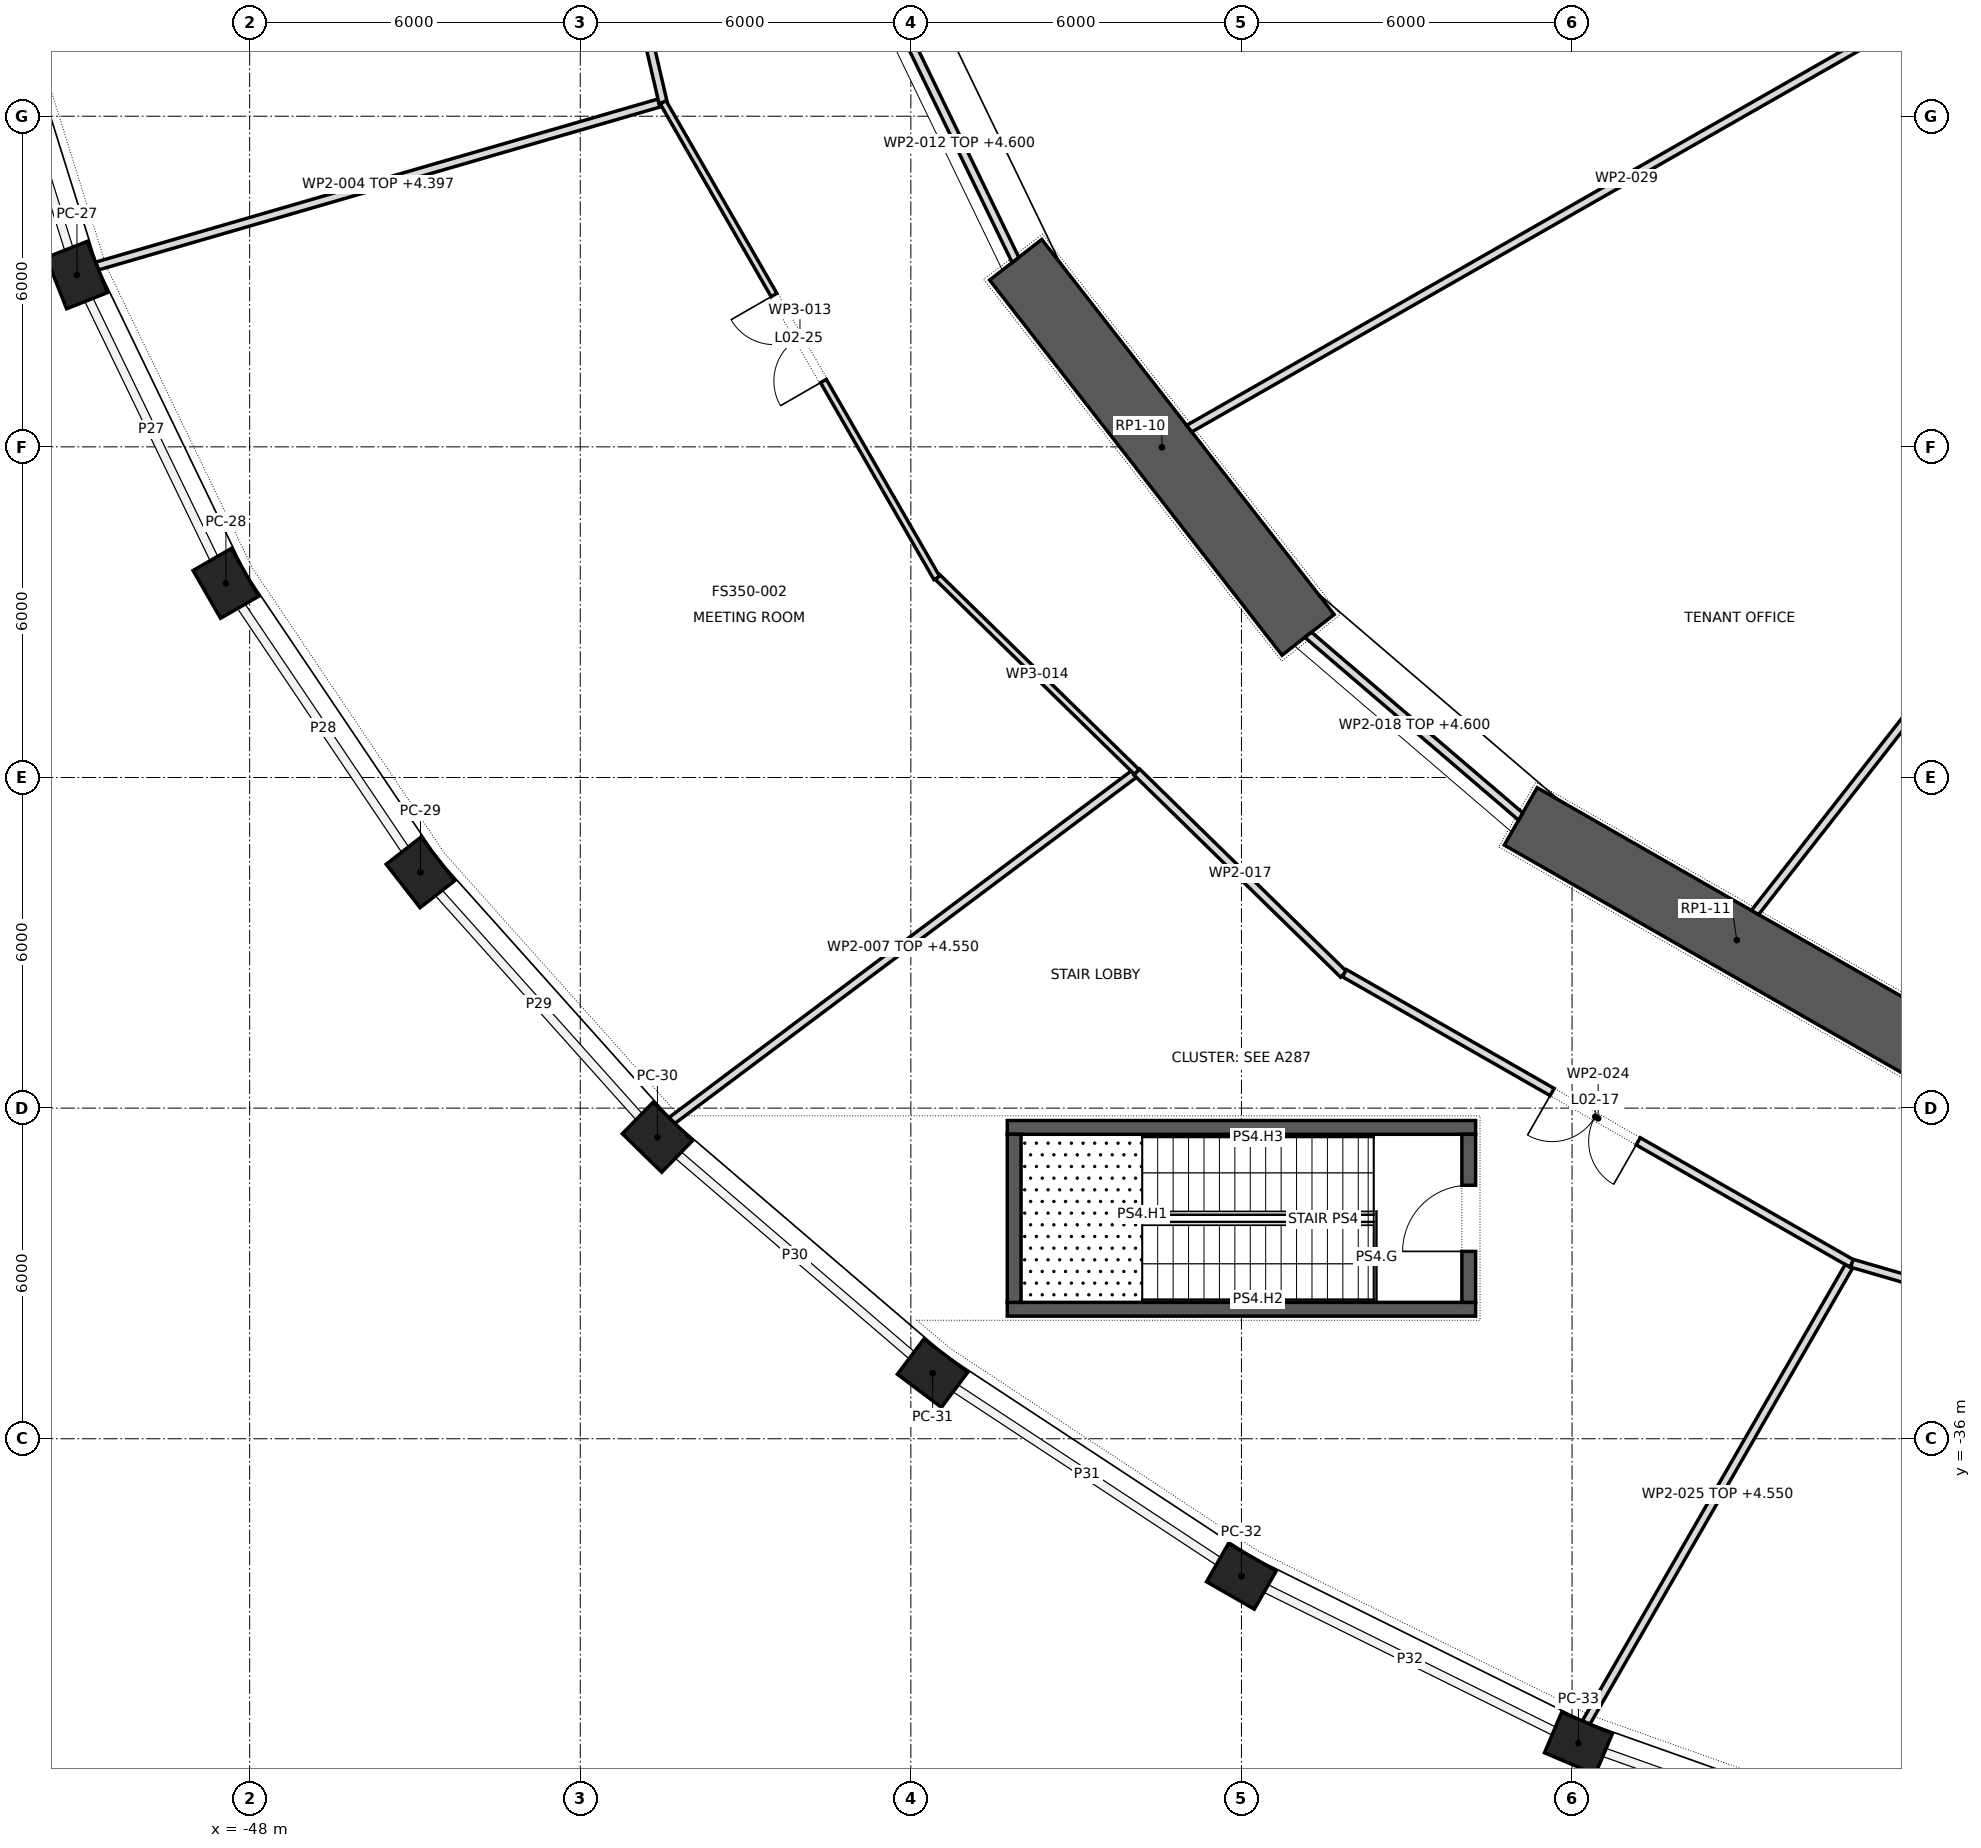
"""IFC4 building model, lengths in metres.
Left out: names, types, materials, properties, quantities, classifications, styles, units other than length and angle.
Written with IfcOpenShell. Run it as: python <this file> out.ifc"""

import sys

from ifc_helpers import new_model, si_unit, direction, frame, frame_2d, origin, origin_2d, place, context, subcontext, project, spatial, polyline, rectangle, outline, extrude, element, fill, save


model = new_model("IFC4")
c1 = context("Model", 3, precision=1e-05, world=origin(), true_north=direction((0.0, 1.0)))
c2 = subcontext(c1, "Body", "Model", "MODEL_VIEW")
j1 = project(units=[si_unit("LENGTHUNIT", "METRE"), si_unit("PLANEANGLEUNIT", "RADIAN")], contexts=[c1])
p1 = place(None, origin())
s1 = spatial("IfcSite", under=j1, at=p1, CompositionType="ELEMENT")
p2 = place(p1, origin())
s2 = spatial("IfcBuilding", under=s1, at=p2, CompositionType="ELEMENT")
p3 = place(p2, frame((0.0, 0.0, 12.5)))
s3 = spatial("IfcBuildingStorey", under=s2, at=p3, CompositionType="ELEMENT", Elevation=12.5)
for number, where, z_axis, x_axis in (
    (1, (-51.134, -14.883, 0.0), (0.0, 0.0, 1.0), (0.368, -0.93, 0.0)),
    (2, (-48.431, -20.478, 0.0), (0.0, 0.0, 1.0), (0.499, -0.867, 0.0)),
    (3, (-44.899, -25.723, 0.0), (0.0, 0.0, 1.0), (0.615, -0.789, 0.0)),
    (4, (-40.599, -30.528, 0.0), (0.0, 0.0, 1.0), (0.715, -0.699, 0.0)),
    (5, (-35.605, -34.81, 0.0), (0.0, 0.0, 1.0), (0.799, -0.601, 0.0)),
    (6, (-30.001, -38.497, 0.0), (0.0, 0.0, 1.0), (0.868, -0.497, 0.0)),
    (7, (-23.884, -41.525, 0.0), (0.0, 0.0, 1.0), (0.921, -0.389, 0.0)),
):
    element("IfcColumn", number, at=place(p3, frame(where, z_axis=z_axis, x_axis=x_axis)), inside=s3, PredefinedType="COLUMN", context=c2, shape_type="SweptSolid", body=[
        extrude(rectangle(XDim=1.0, YDim=0.8, at=origin_2d()), origin(), (0.0, 0.0, 1.0), 5.5),
    ])
p4 = place(p3, frame((-34.097, -14.605, 0.0), z_axis=(0.0, 0.0, 1.0), x_axis=(0.614825322247, -0.788663314174, 0.0)))
e8 = element("IfcWall", 8, at=p4, inside=s3, PredefinedType="SHEAR", context=c2, shape_type="SweptSolid", body=[
    extrude(rectangle(XDim=8.632, YDim=1.2, at=frame_2d((4.316, 0.0))), origin(), (0.0, 0.0, 1.0), 5.5),
])
p5 = place(p3, frame((-24.931, -24.706, 0.0), z_axis=(0.0, 0.0, 1.0), x_axis=(0.867760656864, -0.496982336103, 0.0)))
e9 = element("IfcWall", 9, at=p5, inside=s3, PredefinedType="SHEAR", context=c2, shape_type="SweptSolid", body=[
    extrude(rectangle(XDim=9.038, YDim=1.2, at=frame_2d((4.519, 0.0))), origin(), (0.0, 0.0, 1.0), 5.5),
])
for number, where, z_axis, x_axis in (
    (10, (-34.25, -30.35, 0.0), (0.0, 0.0, 1.0), (1.0, 0.0, 0.0)),
    (11, (-34.25, -33.65, 0.0), (0.0, 0.0, 1.0), (1.0, 0.0, 0.0)),
):
    element("IfcWall", number, at=place(p3, frame(where, z_axis=z_axis, x_axis=x_axis)), inside=s3, PredefinedType="SHEAR", context=c2, shape_type="SweptSolid", body=[
        extrude(rectangle(XDim=8.5, YDim=0.25, at=frame_2d((4.25, 0.0))), origin(), (0.0, 0.0, 1.0), 5.15),
    ])
p6 = place(p3, frame((-34.125, -33.525, 0.0), z_axis=(0.0, 0.0, 1.0), x_axis=(0.0, 1.0, 0.0)))
e12 = element("IfcWall", 12, at=p6, inside=s3, PredefinedType="SHEAR", context=c2, shape_type="SweptSolid", body=[
    extrude(rectangle(XDim=3.05, YDim=0.25, at=frame_2d((1.525, 0.0))), origin(), (0.0, 0.0, 1.0), 5.15),
])
p7 = place(p3, frame((-25.875, -33.525, 0.0), z_axis=(0.0, 0.0, 1.0), x_axis=(0.0, 1.0, 0.0)))
e13 = element("IfcWall", 13, at=p7, inside=s3, PredefinedType="SHEAR", context=c2, shape_type="SweptSolid", body=[
    extrude(rectangle(XDim=3.05, YDim=0.25, at=frame_2d((1.525, 0.0))), origin(), (0.0, 0.0, 1.0), 5.15),
])
p8 = place(p7, frame((0.925, 0.0, 0.0)))
e14 = element("IfcOpeningElement", 14, at=p8, cuts=e13, PredefinedType="OPENING", context=c2, shape_type="SweptSolid", body=[
    extrude(rectangle(XDim=1.2, YDim=2.1, at=frame_2d((0.6, 1.05))), frame((0.0, 0.137, 0.0), z_axis=(0.0, -1.0, 0.0), x_axis=(1.0, 0.0, 0.0)), (0.0, 0.0, 1.0), 0.274),
])
p9 = place(p3, frame((-40.572, -11.761, 0.0), z_axis=(0.0, 0.0, 1.0), x_axis=(-0.960400225856, -0.278624130642, 0.0)))
e15 = element("IfcWall", 15, at=p9, inside=s3, PredefinedType="PARTITIONING", context=c2, shape_type="SweptSolid", body=[
    extrude(outline(polyline([(0.0, -0.075), (10.625, -0.075), (10.611, 0.075), (0.0, 0.075), (0.0, -0.075)])), origin(), (0.0, 0.0, 1.0), 4.397),
])
p10 = place(p3, frame((-40.498, -11.749, 0.0), z_axis=(0.0, 0.0, 1.0), x_axis=(-0.226077870445, 0.974109232322, 0.0)))
e16 = element("IfcWall", 16, at=p10, inside=s3, PredefinedType="PARTITIONING", context=c2, shape_type="SweptSolid", body=[
    extrude(rectangle(XDim=9.497, YDim=0.15, at=frame_2d((4.748, 0.0))), origin(), (0.0, 0.0, 1.0), 5.15),
])
p11 = place(p3, frame((-40.337, -30.226, 0.0), z_axis=(0.0, 0.0, 1.0), x_axis=(0.800114543622, 0.599847244792, 0.0)))
e17 = element("IfcWall", 17, at=p11, inside=s3, PredefinedType="PARTITIONING", context=c2, shape_type="SweptSolid", body=[
    extrude(outline(polyline([(0.011, -0.075), (10.485, -0.075), (10.485, 0.075), (-0.011, 0.075), (0.011, -0.075)])), origin(), (0.0, 0.0, 1.0), 4.55),
])
p12 = place(p3, frame((-36.15, -10.38, 0.0), z_axis=(0.0, 0.0, 1.0), x_axis=(0.436102687495, -0.899896908518, 0.0)))
e18 = element("IfcWall", 18, at=p12, inside=s3, PredefinedType="PARTITIONING", context=c2, shape_type="SweptSolid", body=[
    extrude(outline(polyline([(-0.017, -0.075), (4.715, -0.075), (4.683, 0.075), (0.017, 0.075), (-0.017, -0.075)])), origin(), (0.0, 0.0, 1.0), 4.6),
])
p13 = place(p3, frame((-35.529, -20.381, 0.0), z_axis=(0.0, 0.0, 1.0), x_axis=(-0.498652566112, 0.866801948723, 0.0)))
e19 = element("IfcWall", 19, at=p13, inside=s3, PredefinedType="PARTITIONING", context=c2, shape_type="SweptSolid", body=[
    extrude(rectangle(XDim=9.96, YDim=0.12, at=frame_2d((4.98, 0.0))), origin(), (0.0, 0.0, 1.0), 5.15),
])
p14 = place(p13, frame((4.125, 0.0, 0.0)))
e20 = element("IfcOpeningElement", 20, at=p14, cuts=e19, PredefinedType="OPENING", context=c2, shape_type="SweptSolid", body=[
    extrude(rectangle(XDim=1.8, YDim=2.1, at=frame_2d((0.9, 1.05))), frame((0.0, 0.072, 0.0), z_axis=(0.0, -1.0, 0.0), x_axis=(1.0, 0.0, 0.0)), (0.0, 0.0, 1.0), 0.144),
])
p15 = place(p3, frame((-35.51, -20.369, 0.0), z_axis=(0.0, 0.0, 1.0), x_axis=(0.714847158957, -0.699280729987, 0.0)))
e21 = element("IfcWall", 21, at=p15, inside=s3, PredefinedType="PARTITIONING", context=c2, shape_type="SweptSolid", body=[
    extrude(rectangle(XDim=5.05, YDim=0.12, at=frame_2d((2.525, 0.0))), origin(), (0.0, 0.0, 1.0), 5.15),
])
p16 = place(p3, frame((-31.9, -23.9, 0.0), z_axis=(0.0, 0.0, 1.0), x_axis=(0.714809256367, -0.699319474212, 0.0)))
e22 = element("IfcWall", 22, at=p16, inside=s3, PredefinedType="PARTITIONING", context=c2, shape_type="SweptSolid", body=[
    extrude(rectangle(XDim=5.249, YDim=0.15, at=frame_2d((2.624, 0.0))), origin(), (0.0, 0.0, 1.0), 5.15),
])
p17 = place(p3, frame((-28.789, -21.411, 0.0), z_axis=(0.0, 0.0, 1.0), x_axis=(0.760084552743, -0.649824185978, 0.0)))
e23 = element("IfcWall", 23, at=p17, inside=s3, PredefinedType="PARTITIONING", context=c2, shape_type="SweptSolid", body=[
    extrude(outline(polyline([(-0.015, -0.075), (5.089, -0.075), (5.061, 0.075), (0.015, 0.075), (-0.015, -0.075)])), origin(), (0.0, 0.0, 1.0), 4.6),
])
p18 = place(p3, frame((-20.68, -26.45, 0.0), z_axis=(0.0, 0.0, 1.0), x_axis=(0.616461511357, 0.787385042413, 0.0)))
e24 = element("IfcWall", 24, at=p18, inside=s3, PredefinedType="PARTITIONING", context=c2, shape_type="SweptSolid", body=[
    extrude(outline(polyline([(0.011, -0.075), (14.518, -0.075), (14.518, 0.075), (-0.011, 0.075), (0.011, -0.075)])), origin(), (0.0, 0.0, 1.0), 5.15),
])
p19 = place(p3, frame((-18.922, -32.82, 0.0), z_axis=(0.0, 0.0, 1.0), x_axis=(-0.867956944139, 0.496639449823, 0.0)))
e25 = element("IfcWall", 25, at=p19, inside=s3, PredefinedType="PARTITIONING", context=c2, shape_type="SweptSolid", body=[
    extrude(rectangle(XDim=10.609, YDim=0.15, at=frame_2d((5.305, 0.0))), origin(), (0.0, 0.0, 1.0), 5.15),
])
p20 = place(p19, frame((4.466, 0.0, 0.0)))
e26 = element("IfcOpeningElement", 26, at=p20, cuts=e25, PredefinedType="OPENING", context=c2, shape_type="SweptSolid", body=[
    extrude(rectangle(XDim=1.8, YDim=2.1, at=frame_2d((0.9, 1.05))), frame((0.0, 0.087, 0.0), z_axis=(0.0, -1.0, 0.0), x_axis=(1.0, 0.0, 0.0)), (0.0, 0.0, 1.0), 0.174),
])
p21 = place(p3, frame((-18.977, -32.875, 0.0), z_axis=(0.0, 0.0, 1.0), x_axis=(-0.499235523932, -0.866466324588, 0.0)))
e27 = element("IfcWall", 27, at=p21, inside=s3, PredefinedType="PARTITIONING", context=c2, shape_type="SweptSolid", body=[
    extrude(outline(polyline([(0.0, -0.075), (9.56, -0.075), (9.542, 0.075), (0.0, 0.075), (0.0, -0.075)])), origin(), (0.0, 0.0, 1.0), 4.55),
])
p22 = place(p3, frame((-15.074, -8.602, 0.0), z_axis=(0.0, 0.0, 1.0), x_axis=(-0.868343386691, -0.495963469209, 0.0)))
e28 = element("IfcWall", 28, at=p22, inside=s3, PredefinedType="PARTITIONING", context=c2, shape_type="SweptSolid", body=[
    extrude(outline(polyline([(-0.043, -0.075), (18.292, -0.075), (18.271, 0.075), (0.043, 0.075), (-0.043, -0.075)])), origin(), (0.0, 0.0, 1.0), 5.15),
])
p23 = place(p3, frame((-8.256, -35.917, 0.0), z_axis=(0.0, 0.0, 1.0), x_axis=(-0.960212446938, 0.279270579805, 0.0)))
e29 = element("IfcWall", 29, at=p23, inside=s3, PredefinedType="PARTITIONING", context=c2, shape_type="SweptSolid", body=[
    extrude(rectangle(XDim=11.106, YDim=0.15, at=frame_2d((5.553, 0.0))), origin(), (0.0, 0.0, 1.0), 5.15),
])
p24 = place(p8, origin())
e30 = element("IfcDoor", 30, at=p24, inside=s3, OperationType="SINGLE_SWING_RIGHT", PredefinedType="DOOR", context=c2, shape_type="SweptSolid", body=[
    extrude(rectangle(XDim=1.2, YDim=2.1, at=frame_2d((0.6, 1.05))), frame((0.0, 0.025, 0.0), z_axis=(0.0, -1.0, 0.0), x_axis=(1.0, 0.0, 0.0)), (0.0, 0.0, 1.0), 0.05),
])
fill(e14, e30)
p25 = place(p20, origin())
e31 = element("IfcDoor", 31, at=p25, inside=s3, OperationType="DOUBLE_DOOR_SINGLE_SWING", PredefinedType="DOOR", context=c2, shape_type="SweptSolid", body=[
    extrude(rectangle(XDim=1.8, YDim=2.1, at=frame_2d((0.9, 1.05))), frame((0.0, 0.025, 0.0), z_axis=(0.0, -1.0, 0.0), x_axis=(1.0, 0.0, 0.0)), (0.0, 0.0, 1.0), 0.05),
])
fill(e26, e31)
p26 = place(p14, origin())
e32 = element("IfcDoor", 32, at=p26, inside=s3, OperationType="DOUBLE_DOOR_SINGLE_SWING", PredefinedType="DOOR", context=c2, shape_type="SweptSolid", body=[
    extrude(rectangle(XDim=1.8, YDim=2.1, at=frame_2d((0.9, 1.05))), frame((0.0, 0.025, 0.0), z_axis=(0.0, -1.0, 0.0), x_axis=(1.0, 0.0, 0.0)), (0.0, 0.0, 1.0), 0.05),
])
fill(e20, e32)
save(model, sys.argv[1])
